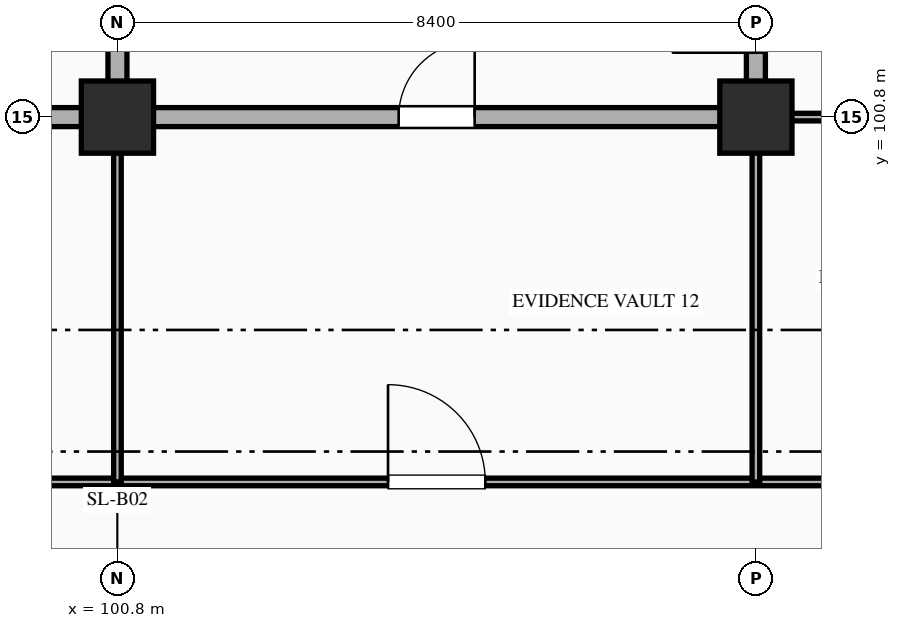
"""IFC4 building model, lengths in metres.
Left out: names, types, materials, properties, quantities, classifications, styles, units other than length and angle.
Written with IfcOpenShell. Run it as: python <this file> out.ifc"""

import sys

from ifc_helpers import new_model, si_unit, direction, frame, frame_2d, origin, origin_2d, place, context, subcontext, project, spatial, rectangle, extrude, element, fill, save


model = new_model("IFC4")
c1 = context("Model", 3, precision=1e-05, world=origin(), true_north=direction((0.0, 1.0)))
c2 = subcontext(c1, "Body", "Model", "MODEL_VIEW")
j1 = project(units=[si_unit("LENGTHUNIT", "METRE"), si_unit("PLANEANGLEUNIT", "RADIAN")], contexts=[c1])
p1 = place(None, origin())
s1 = spatial("IfcSite", under=j1, at=p1, CompositionType="ELEMENT")
p2 = place(p1, origin())
s2 = spatial("IfcBuilding", under=s1, at=p2, CompositionType="ELEMENT")
p3 = place(p2, frame((0.0, 0.0, -10.2)))
s3 = spatial("IfcBuildingStorey", under=s2, at=p3, CompositionType="ELEMENT", Elevation=-10.2)
for number, where, z_axis, x_axis in (
    (1, (100.8, 100.8, 0.0), (0.0, 0.0, 1.0), (1.0, 0.0, 0.0)),
    (2, (109.2, 100.8, 0.0), (0.0, 0.0, 1.0), (1.0, 0.0, 0.0)),
):
    element("IfcColumn", number, at=place(p3, frame(where, z_axis=z_axis, x_axis=x_axis)), inside=s3, PredefinedType="COLUMN", context=c2, shape_type="SweptSolid", body=[
        extrude(rectangle(XDim=0.95, YDim=0.95, at=origin_2d()), origin(), (0.0, 0.0, 1.0), 4.8),
    ])
p4 = place(p3, frame((0.04, 96.0, 0.0), z_axis=(0.0, 0.0, 1.0), x_axis=(1.0, 0.0, 0.0)))
e3 = element("IfcWall", 3, at=p4, inside=s3, PredefinedType="STANDARD", context=c2, shape_type="SweptSolid", body=[
    extrude(rectangle(XDim=151.16, YDim=0.1, at=frame_2d((75.58, 0.0))), origin(), (0.0, 0.0, 1.0), 4.48),
])
p5 = place(p4, frame((1.04, 0.0, 0.0)))
e4 = element("IfcOpeningElement", 4, at=p5, cuts=e3, PredefinedType="OPENING", context=c2, shape_type="SweptSolid", body=[
    extrude(rectangle(XDim=1.28, YDim=2.35, at=frame_2d((0.64, 1.175))), frame((0.0, 0.062, 0.0), z_axis=(0.0, -1.0, 0.0), x_axis=(1.0, 0.0, 0.0)), (0.0, 0.0, 1.0), 0.124),
])
p6 = place(p4, frame((4.09, 0.0, 0.0)))
e5 = element("IfcOpeningElement", 5, at=p6, cuts=e3, PredefinedType="OPENING", context=c2, shape_type="SweptSolid", body=[
    extrude(rectangle(XDim=0.94, YDim=2.3, at=frame_2d((0.47, 1.15))), frame((0.0, 0.062, 0.0), z_axis=(0.0, -1.0, 0.0), x_axis=(1.0, 0.0, 0.0)), (0.0, 0.0, 1.0), 0.124),
])
p7 = place(p4, frame((6.57, 0.0, 0.0)))
e6 = element("IfcOpeningElement", 6, at=p7, cuts=e3, PredefinedType="OPENING", context=c2, shape_type="SweptSolid", body=[
    extrude(rectangle(XDim=0.98, YDim=2.35, at=frame_2d((0.49, 1.175))), frame((0.0, 0.062, 0.0), z_axis=(0.0, -1.0, 0.0), x_axis=(1.0, 0.0, 0.0)), (0.0, 0.0, 1.0), 0.124),
])
p8 = place(p4, frame((12.05, 0.0, 0.0)))
e7 = element("IfcOpeningElement", 7, at=p8, cuts=e3, PredefinedType="OPENING", context=c2, shape_type="SweptSolid", body=[
    extrude(rectangle(XDim=1.02, YDim=2.4, at=frame_2d((0.51, 1.2))), frame((0.0, 0.062, 0.0), z_axis=(0.0, -1.0, 0.0), x_axis=(1.0, 0.0, 0.0)), (0.0, 0.0, 1.0), 0.124),
])
p9 = place(p4, frame((20.43, 0.0, 0.0)))
e8 = element("IfcOpeningElement", 8, at=p9, cuts=e3, PredefinedType="OPENING", context=c2, shape_type="SweptSolid", body=[
    extrude(rectangle(XDim=1.06, YDim=2.4, at=frame_2d((0.53, 1.2))), frame((0.0, 0.062, 0.0), z_axis=(0.0, -1.0, 0.0), x_axis=(1.0, 0.0, 0.0)), (0.0, 0.0, 1.0), 0.124),
])
p10 = place(p4, frame((26.29, 0.0, 0.0)))
e9 = element("IfcOpeningElement", 9, at=p10, cuts=e3, PredefinedType="OPENING", context=c2, shape_type="SweptSolid", body=[
    extrude(rectangle(XDim=1.14, YDim=2.4, at=frame_2d((0.57, 1.2))), frame((0.0, 0.062, 0.0), z_axis=(0.0, -1.0, 0.0), x_axis=(1.0, 0.0, 0.0)), (0.0, 0.0, 1.0), 0.124),
])
p11 = place(p4, frame((29.31, 0.0, 0.0)))
e10 = element("IfcOpeningElement", 10, at=p11, cuts=e3, PredefinedType="OPENING", context=c2, shape_type="SweptSolid", body=[
    extrude(rectangle(XDim=0.9, YDim=2.15, at=frame_2d((0.45, 1.075))), frame((0.0, 0.062, 0.0), z_axis=(0.0, -1.0, 0.0), x_axis=(1.0, 0.0, 0.0)), (0.0, 0.0, 1.0), 0.124),
])
p12 = place(p4, frame((31.83, 0.0, 0.0)))
e11 = element("IfcOpeningElement", 11, at=p12, cuts=e3, PredefinedType="OPENING", context=c2, shape_type="SweptSolid", body=[
    extrude(rectangle(XDim=0.86, YDim=2.1, at=frame_2d((0.43, 1.05))), frame((0.0, 0.062, 0.0), z_axis=(0.0, -1.0, 0.0), x_axis=(1.0, 0.0, 0.0)), (0.0, 0.0, 1.0), 0.124),
])
p13 = place(p4, frame((37.3, 0.0, 0.0)))
e12 = element("IfcOpeningElement", 12, at=p13, cuts=e3, PredefinedType="OPENING", context=c2, shape_type="SweptSolid", body=[
    extrude(rectangle(XDim=0.92, YDim=2.15, at=frame_2d((0.46, 1.075))), frame((0.0, 0.062, 0.0), z_axis=(0.0, -1.0, 0.0), x_axis=(1.0, 0.0, 0.0)), (0.0, 0.0, 1.0), 0.124),
])
p14 = place(p4, frame((45.68, 0.0, 0.0)))
e13 = element("IfcOpeningElement", 13, at=p14, cuts=e3, PredefinedType="OPENING", context=c2, shape_type="SweptSolid", body=[
    extrude(rectangle(XDim=0.96, YDim=2.2, at=frame_2d((0.48, 1.1))), frame((0.0, 0.062, 0.0), z_axis=(0.0, -1.0, 0.0), x_axis=(1.0, 0.0, 0.0)), (0.0, 0.0, 1.0), 0.124),
])
p15 = place(p4, frame((51.57, 0.0, 0.0)))
e14 = element("IfcOpeningElement", 14, at=p15, cuts=e3, PredefinedType="OPENING", context=c2, shape_type="SweptSolid", body=[
    extrude(rectangle(XDim=0.98, YDim=2.35, at=frame_2d((0.49, 1.175))), frame((0.0, 0.062, 0.0), z_axis=(0.0, -1.0, 0.0), x_axis=(1.0, 0.0, 0.0)), (0.0, 0.0, 1.0), 0.124),
])
p16 = place(p4, frame((54.45, 0.0, 0.0)))
e15 = element("IfcOpeningElement", 15, at=p16, cuts=e3, PredefinedType="OPENING", context=c2, shape_type="SweptSolid", body=[
    extrude(rectangle(XDim=1.02, YDim=2.4, at=frame_2d((0.51, 1.2))), frame((0.0, 0.062, 0.0), z_axis=(0.0, -1.0, 0.0), x_axis=(1.0, 0.0, 0.0)), (0.0, 0.0, 1.0), 0.124),
])
p17 = place(p4, frame((56.93, 0.0, 0.0)))
e16 = element("IfcOpeningElement", 16, at=p17, cuts=e3, PredefinedType="OPENING", context=c2, shape_type="SweptSolid", body=[
    extrude(rectangle(XDim=1.06, YDim=2.4, at=frame_2d((0.53, 1.2))), frame((0.0, 0.062, 0.0), z_axis=(0.0, -1.0, 0.0), x_axis=(1.0, 0.0, 0.0)), (0.0, 0.0, 1.0), 0.124),
])
p18 = place(p4, frame((62.39, 0.0, 0.0)))
e17 = element("IfcOpeningElement", 17, at=p18, cuts=e3, PredefinedType="OPENING", context=c2, shape_type="SweptSolid", body=[
    extrude(rectangle(XDim=1.14, YDim=2.4, at=frame_2d((0.57, 1.2))), frame((0.0, 0.062, 0.0), z_axis=(0.0, -1.0, 0.0), x_axis=(1.0, 0.0, 0.0)), (0.0, 0.0, 1.0), 0.124),
])
p19 = place(p4, frame((70.91, 0.0, 0.0)))
e18 = element("IfcOpeningElement", 18, at=p19, cuts=e3, PredefinedType="OPENING", context=c2, shape_type="SweptSolid", body=[
    extrude(rectangle(XDim=0.9, YDim=2.15, at=frame_2d((0.45, 1.075))), frame((0.0, 0.062, 0.0), z_axis=(0.0, -1.0, 0.0), x_axis=(1.0, 0.0, 0.0)), (0.0, 0.0, 1.0), 0.124),
])
p20 = place(p4, frame((79.33, 0.0, 0.0)))
e19 = element("IfcOpeningElement", 19, at=p20, cuts=e3, PredefinedType="OPENING", context=c2, shape_type="SweptSolid", body=[
    extrude(rectangle(XDim=0.86, YDim=2.1, at=frame_2d((0.43, 1.05))), frame((0.0, 0.062, 0.0), z_axis=(0.0, -1.0, 0.0), x_axis=(1.0, 0.0, 0.0)), (0.0, 0.0, 1.0), 0.124),
])
p21 = place(p4, frame((85.1, 0.0, 0.0)))
e20 = element("IfcOpeningElement", 20, at=p21, cuts=e3, PredefinedType="OPENING", context=c2, shape_type="SweptSolid", body=[
    extrude(rectangle(XDim=1.12, YDim=2.25, at=frame_2d((0.56, 1.125))), frame((0.0, 0.062, 0.0), z_axis=(0.0, -1.0, 0.0), x_axis=(1.0, 0.0, 0.0)), (0.0, 0.0, 1.0), 0.124),
])
p22 = place(p4, frame((87.98, 0.0, 0.0)))
e21 = element("IfcOpeningElement", 21, at=p22, cuts=e3, PredefinedType="OPENING", context=c2, shape_type="SweptSolid", body=[
    extrude(rectangle(XDim=1.16, YDim=2.3, at=frame_2d((0.58, 1.15))), frame((0.0, 0.062, 0.0), z_axis=(0.0, -1.0, 0.0), x_axis=(1.0, 0.0, 0.0)), (0.0, 0.0, 1.0), 0.124),
])
p23 = place(p4, frame((90.46, 0.0, 0.0)))
e22 = element("IfcOpeningElement", 22, at=p23, cuts=e3, PredefinedType="OPENING", context=c2, shape_type="SweptSolid", body=[
    extrude(rectangle(XDim=1.2, YDim=2.35, at=frame_2d((0.6, 1.175))), frame((0.0, 0.062, 0.0), z_axis=(0.0, -1.0, 0.0), x_axis=(1.0, 0.0, 0.0)), (0.0, 0.0, 1.0), 0.124),
])
p24 = place(p4, frame((95.94, 0.0, 0.0)))
e23 = element("IfcOpeningElement", 23, at=p24, cuts=e3, PredefinedType="OPENING", context=c2, shape_type="SweptSolid", body=[
    extrude(rectangle(XDim=1.24, YDim=2.3, at=frame_2d((0.62, 1.15))), frame((0.0, 0.062, 0.0), z_axis=(0.0, -1.0, 0.0), x_axis=(1.0, 0.0, 0.0)), (0.0, 0.0, 1.0), 0.124),
])
p25 = place(p4, frame((104.32, 0.0, 0.0)))
e24 = element("IfcOpeningElement", 24, at=p25, cuts=e3, PredefinedType="OPENING", context=c2, shape_type="SweptSolid", body=[
    extrude(rectangle(XDim=1.28, YDim=2.35, at=frame_2d((0.64, 1.175))), frame((0.0, 0.062, 0.0), z_axis=(0.0, -1.0, 0.0), x_axis=(1.0, 0.0, 0.0)), (0.0, 0.0, 1.0), 0.124),
])
p26 = place(p4, frame((110.39, 0.0, 0.0)))
e25 = element("IfcOpeningElement", 25, at=p26, cuts=e3, PredefinedType="OPENING", context=c2, shape_type="SweptSolid", body=[
    extrude(rectangle(XDim=0.94, YDim=2.3, at=frame_2d((0.47, 1.15))), frame((0.0, 0.062, 0.0), z_axis=(0.0, -1.0, 0.0), x_axis=(1.0, 0.0, 0.0)), (0.0, 0.0, 1.0), 0.124),
])
p27 = place(p4, frame((113.27, 0.0, 0.0)))
e26 = element("IfcOpeningElement", 26, at=p27, cuts=e3, PredefinedType="OPENING", context=c2, shape_type="SweptSolid", body=[
    extrude(rectangle(XDim=0.98, YDim=2.35, at=frame_2d((0.49, 1.175))), frame((0.0, 0.062, 0.0), z_axis=(0.0, -1.0, 0.0), x_axis=(1.0, 0.0, 0.0)), (0.0, 0.0, 1.0), 0.124),
])
p28 = place(p4, frame((115.75, 0.0, 0.0)))
e27 = element("IfcOpeningElement", 27, at=p28, cuts=e3, PredefinedType="OPENING", context=c2, shape_type="SweptSolid", body=[
    extrude(rectangle(XDim=1.02, YDim=2.4, at=frame_2d((0.51, 1.2))), frame((0.0, 0.062, 0.0), z_axis=(0.0, -1.0, 0.0), x_axis=(1.0, 0.0, 0.0)), (0.0, 0.0, 1.0), 0.124),
])
p29 = place(p4, frame((121.24, 0.0, 0.0)))
e28 = element("IfcOpeningElement", 28, at=p29, cuts=e3, PredefinedType="OPENING", context=c2, shape_type="SweptSolid", body=[
    extrude(rectangle(XDim=1.04, YDim=2.2, at=frame_2d((0.52, 1.1))), frame((0.0, 0.062, 0.0), z_axis=(0.0, -1.0, 0.0), x_axis=(1.0, 0.0, 0.0)), (0.0, 0.0, 1.0), 0.124),
])
p30 = place(p4, frame((129.62, 0.0, 0.0)))
e29 = element("IfcOpeningElement", 29, at=p30, cuts=e3, PredefinedType="OPENING", context=c2, shape_type="SweptSolid", body=[
    extrude(rectangle(XDim=1.08, YDim=2.25, at=frame_2d((0.54, 1.125))), frame((0.0, 0.062, 0.0), z_axis=(0.0, -1.0, 0.0), x_axis=(1.0, 0.0, 0.0)), (0.0, 0.0, 1.0), 0.124),
])
p31 = place(p4, frame((135.5, 0.0, 0.0)))
e30 = element("IfcOpeningElement", 30, at=p31, cuts=e3, PredefinedType="OPENING", context=c2, shape_type="SweptSolid", body=[
    extrude(rectangle(XDim=1.12, YDim=2.25, at=frame_2d((0.56, 1.125))), frame((0.0, 0.062, 0.0), z_axis=(0.0, -1.0, 0.0), x_axis=(1.0, 0.0, 0.0)), (0.0, 0.0, 1.0), 0.124),
])
p32 = place(p4, frame((138.38, 0.0, 0.0)))
e31 = element("IfcOpeningElement", 31, at=p32, cuts=e3, PredefinedType="OPENING", context=c2, shape_type="SweptSolid", body=[
    extrude(rectangle(XDim=1.16, YDim=2.3, at=frame_2d((0.58, 1.15))), frame((0.0, 0.062, 0.0), z_axis=(0.0, -1.0, 0.0), x_axis=(1.0, 0.0, 0.0)), (0.0, 0.0, 1.0), 0.124),
])
p33 = place(p4, frame((140.86, 0.0, 0.0)))
e32 = element("IfcOpeningElement", 32, at=p33, cuts=e3, PredefinedType="OPENING", context=c2, shape_type="SweptSolid", body=[
    extrude(rectangle(XDim=1.2, YDim=2.35, at=frame_2d((0.6, 1.175))), frame((0.0, 0.062, 0.0), z_axis=(0.0, -1.0, 0.0), x_axis=(1.0, 0.0, 0.0)), (0.0, 0.0, 1.0), 0.124),
])
p34 = place(p4, frame((146.34, 0.0, 0.0)))
e33 = element("IfcOpeningElement", 33, at=p34, cuts=e3, PredefinedType="OPENING", context=c2, shape_type="SweptSolid", body=[
    extrude(rectangle(XDim=1.24, YDim=2.3, at=frame_2d((0.62, 1.15))), frame((0.0, 0.062, 0.0), z_axis=(0.0, -1.0, 0.0), x_axis=(1.0, 0.0, 0.0)), (0.0, 0.0, 1.0), 0.124),
])
p35 = place(p3, frame((96.6, 100.8, 0.0), z_axis=(0.0, 0.0, 1.0), x_axis=(1.0, 0.0, 0.0)))
e34 = element("IfcWall", 34, at=p35, inside=s3, PredefinedType="STANDARD", context=c2, shape_type="SweptSolid", body=[
    extrude(rectangle(XDim=12.6, YDim=0.25, at=frame_2d((6.3, 0.0))), origin(), (0.0, 0.0, 1.0), 3.63),
])
p36 = place(p35, frame((7.9, 0.0, 0.0)))
e35 = element("IfcOpeningElement", 35, at=p36, cuts=e34, PredefinedType="OPENING", context=c2, shape_type="SweptSolid", body=[
    extrude(rectangle(XDim=1.0, YDim=2.2, at=frame_2d((0.5, 1.1))), frame((0.0, 0.137, 0.0), z_axis=(0.0, -1.0, 0.0), x_axis=(1.0, 0.0, 0.0)), (0.0, 0.0, 1.0), 0.274),
])
p37 = place(p3, frame((109.2, 100.8, 0.0), z_axis=(0.0, 0.0, 1.0), x_axis=(1.0, 0.0, 0.0)))
e36 = element("IfcWall", 36, at=p37, inside=s3, PredefinedType="STANDARD", context=c2, shape_type="SweptSolid", body=[
    extrude(rectangle(XDim=12.6, YDim=0.1, at=frame_2d((6.3, 0.0))), origin(), (0.0, 0.0, 1.0), 3.63),
])
p38 = place(p37, frame((10.228, 0.0, 0.0)))
e37 = element("IfcOpeningElement", 37, at=p38, cuts=e36, PredefinedType="OPENING", context=c2, shape_type="SweptSolid", body=[
    extrude(rectangle(XDim=0.94, YDim=2.3, at=frame_2d((0.47, 1.15))), frame((0.0, 0.062, 0.0), z_axis=(0.0, -1.0, 0.0), x_axis=(1.0, 0.0, 0.0)), (0.0, 0.0, 1.0), 0.124),
])
p39 = place(p37, frame((1.468, 0.0, 0.0)))
e38 = element("IfcOpeningElement", 38, at=p39, cuts=e36, PredefinedType="OPENING", context=c2, shape_type="SweptSolid", body=[
    extrude(rectangle(XDim=0.86, YDim=2.1, at=frame_2d((0.43, 1.05))), frame((0.0, 0.062, 0.0), z_axis=(0.0, -1.0, 0.0), x_axis=(1.0, 0.0, 0.0)), (0.0, 0.0, 1.0), 0.124),
])
p40 = place(p37, frame((4.14, 0.0, 0.0)))
e39 = element("IfcOpeningElement", 39, at=p40, cuts=e36, PredefinedType="OPENING", context=c2, shape_type="SweptSolid", body=[
    extrude(rectangle(XDim=0.92, YDim=2.15, at=frame_2d((0.46, 1.075))), frame((0.0, 0.062, 0.0), z_axis=(0.0, -1.0, 0.0), x_axis=(1.0, 0.0, 0.0)), (0.0, 0.0, 1.0), 0.124),
])
p41 = place(p37, frame((6.423, 0.0, 0.0)))
e40 = element("IfcOpeningElement", 40, at=p41, cuts=e36, PredefinedType="OPENING", context=c2, shape_type="SweptSolid", body=[
    extrude(rectangle(XDim=0.96, YDim=2.2, at=frame_2d((0.48, 1.1))), frame((0.0, 0.062, 0.0), z_axis=(0.0, -1.0, 0.0), x_axis=(1.0, 0.0, 0.0)), (0.0, 0.0, 1.0), 0.124),
])
p42 = place(p3, frame((100.8, 96.0, 0.0), z_axis=(0.0, 0.0, 1.0), x_axis=(0.0, 1.0, 0.0)))
e41 = element("IfcWall", 41, at=p42, inside=s3, PredefinedType="STANDARD", context=c2, shape_type="SweptSolid", body=[
    extrude(rectangle(XDim=4.8, YDim=0.1, at=frame_2d((2.4, 0.0))), origin(), (0.0, 0.0, 1.0), 3.73),
])
p43 = place(p3, frame((100.8, 100.8, 0.0), z_axis=(0.0, 0.0, 1.0), x_axis=(0.0, 1.0, 0.0)))
e42 = element("IfcWall", 42, at=p43, inside=s3, PredefinedType="STANDARD", context=c2, shape_type="SweptSolid", body=[
    extrude(rectangle(XDim=2.4, YDim=0.25, at=frame_2d((1.2, 0.0))), origin(), (0.0, 0.0, 1.0), 3.73),
])
p44 = place(p43, frame((0.923, 0.0, 0.0)))
e43 = element("IfcOpeningElement", 43, at=p44, cuts=e42, PredefinedType="OPENING", context=c2, shape_type="SweptSolid", body=[
    extrude(rectangle(XDim=0.95, YDim=2.15, at=frame_2d((0.475, 1.075))), frame((0.0, 0.137, 0.0), z_axis=(0.0, -1.0, 0.0), x_axis=(1.0, 0.0, 0.0)), (0.0, 0.0, 1.0), 0.274),
])
p45 = place(p3, frame((109.2, 96.0, 0.0), z_axis=(0.0, 0.0, 1.0), x_axis=(0.0, 1.0, 0.0)))
e44 = element("IfcWall", 44, at=p45, inside=s3, PredefinedType="STANDARD", context=c2, shape_type="SweptSolid", body=[
    extrude(rectangle(XDim=4.8, YDim=0.1, at=frame_2d((2.4, 0.0))), origin(), (0.0, 0.0, 1.0), 3.73),
])
p46 = place(p3, frame((109.2, 100.8, 0.0), z_axis=(0.0, 0.0, 1.0), x_axis=(0.0, 1.0, 0.0)))
e45 = element("IfcWall", 45, at=p46, inside=s3, PredefinedType="STANDARD", context=c2, shape_type="SweptSolid", body=[
    extrude(rectangle(XDim=2.4, YDim=0.25, at=frame_2d((1.2, 0.0))), origin(), (0.0, 0.0, 1.0), 3.73),
])
p47 = place(p46, frame((0.847, 0.0, 0.0)))
e46 = element("IfcOpeningElement", 46, at=p47, cuts=e45, PredefinedType="OPENING", context=c2, shape_type="SweptSolid", body=[
    extrude(rectangle(XDim=1.1, YDim=2.2, at=frame_2d((0.55, 1.1))), frame((0.0, 0.137, 0.0), z_axis=(0.0, -1.0, 0.0), x_axis=(1.0, 0.0, 0.0)), (0.0, 0.0, 1.0), 0.274),
])
p48 = place(p47, origin())
e47 = element("IfcDoor", 47, at=p48, inside=s3, OperationType="SINGLE_SWING_LEFT", PredefinedType="DOOR", context=c2, shape_type="SweptSolid", body=[
    extrude(rectangle(XDim=1.1, YDim=2.2, at=frame_2d((0.55, 1.1))), frame((0.0, 0.025, 0.0), z_axis=(0.0, -1.0, 0.0), x_axis=(1.0, 0.0, 0.0)), (0.0, 0.0, 1.0), 0.05),
])
fill(e46, e47)
p49 = place(p36, origin())
e48 = element("IfcDoor", 48, at=p49, inside=s3, OperationType="SINGLE_SWING_RIGHT", PredefinedType="DOOR", context=c2, shape_type="SweptSolid", body=[
    extrude(rectangle(XDim=1.0, YDim=2.2, at=frame_2d((0.5, 1.1))), frame((0.0, 0.025, 0.0), z_axis=(0.0, -1.0, 0.0), x_axis=(1.0, 0.0, 0.0)), (0.0, 0.0, 1.0), 0.05),
])
fill(e35, e48)
p50 = place(p25, origin())
e49 = element("IfcDoor", 49, at=p50, inside=s3, OperationType="SINGLE_SWING_LEFT", PredefinedType="DOOR", context=c2, shape_type="SweptSolid", body=[
    extrude(rectangle(XDim=1.28, YDim=2.35, at=frame_2d((0.64, 1.175))), frame((0.0, 0.025, 0.0), z_axis=(0.0, -1.0, 0.0), x_axis=(1.0, 0.0, 0.0)), (0.0, 0.0, 1.0), 0.05),
])
fill(e24, e49)
save(model, sys.argv[1])
